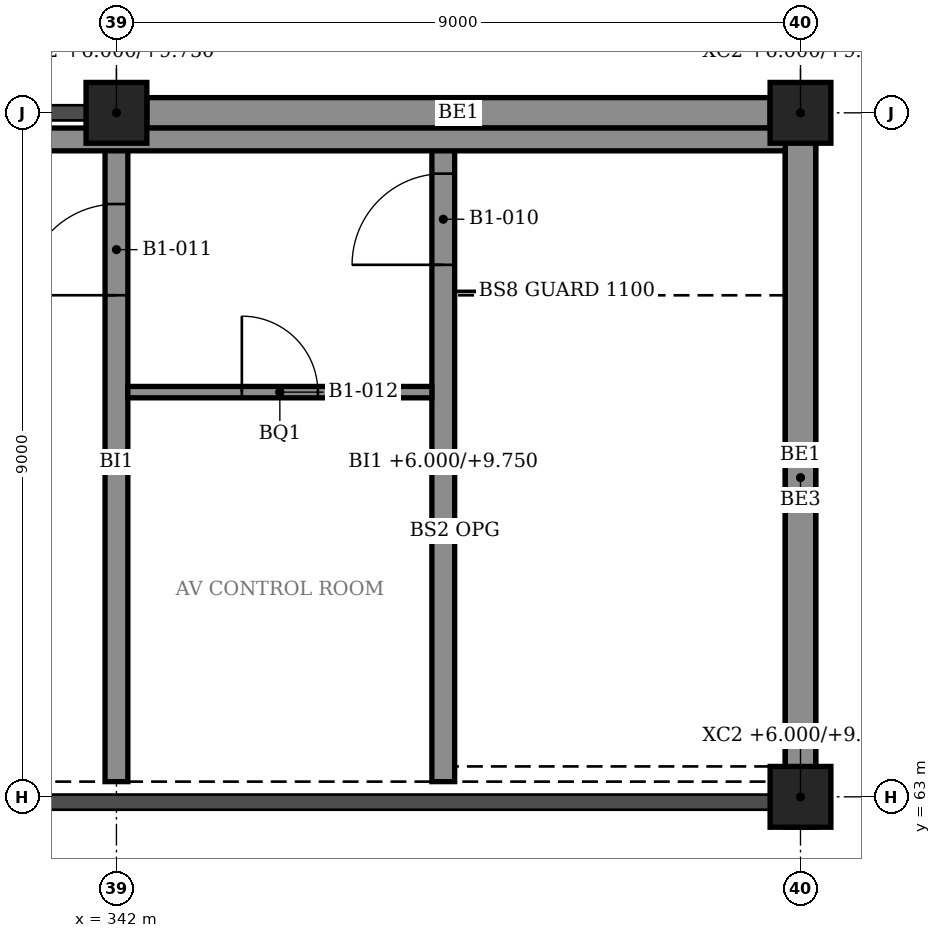
"""IFC4 building model, lengths in metres.
Left out: names, types, materials, properties, quantities, classifications, styles, units other than length and angle.
Written with IfcOpenShell. Run it as: python <this file> out.ifc"""

import sys

from ifc_helpers import new_model, si_unit, direction, frame, frame_2d, origin, origin_2d, place, context, subcontext, project, spatial, rectangle, extrude, element, fill, save


model = new_model("IFC4")
c1 = context("Model", 3, precision=1e-05, world=origin(), true_north=direction((0.0, 1.0)))
c2 = subcontext(c1, "Body", "Model", "MODEL_VIEW")
j1 = project(units=[si_unit("LENGTHUNIT", "METRE"), si_unit("PLANEANGLEUNIT", "RADIAN")], contexts=[c1])
p1 = place(None, origin())
s1 = spatial("IfcSite", under=j1, at=p1, CompositionType="ELEMENT")
p2 = place(p1, origin())
s2 = spatial("IfcBuilding", under=s1, at=p2, CompositionType="ELEMENT")
p3 = place(p2, frame((0.0, 0.0, 6.0)))
s3 = spatial("IfcBuildingStorey", under=s2, at=p3, CompositionType="ELEMENT", Elevation=6.0)
for number, where, z_axis, x_axis in (
    (1, (351.0, 63.0, 0.0), (0.0, 0.0, 1.0), (1.0, 0.0, 0.0)),
    (2, (342.0, 72.0, 0.0), (0.0, 0.0, 1.0), (1.0, 0.0, 0.0)),
    (3, (351.0, 72.0, 0.0), (0.0, 0.0, 1.0), (1.0, 0.0, 0.0)),
):
    element("IfcColumn", number, at=place(p3, frame(where, z_axis=z_axis, x_axis=x_axis)), inside=s3, PredefinedType="COLUMN", context=c2, shape_type="SweptSolid", body=[
        extrude(rectangle(XDim=0.8, YDim=0.8, at=origin_2d()), origin(), (0.0, 0.0, 1.0), 3.75),
    ])
p4 = place(p2, origin())
s4 = spatial("IfcBuildingStorey", under=s2, at=p4, CompositionType="ELEMENT", Elevation=0.0)
p5 = place(p4, frame((288.4, 63.0, -0.3), z_axis=(0.0, 0.0, 1.0), x_axis=(1.0, 0.0, 0.0)))
e4 = element("IfcWall", 4, at=p5, inside=s4, PredefinedType="SHEAR", context=c2, shape_type="SweptSolid", body=[
    extrude(rectangle(XDim=62.2, YDim=0.4, at=frame_2d((31.1, 0.0))), origin(), (0.0, 0.0, 1.0), 10.625),
])
p6 = place(p5, frame((14.25, 0.0, 0.3)))
e5 = element("IfcOpeningElement", 5, at=p6, cuts=e4, PredefinedType="OPENING", context=c2, shape_type="SweptSolid", body=[
    extrude(rectangle(XDim=2.7, YDim=2.4, at=frame_2d((1.35, 1.2))), frame((0.0, 0.21, 0.0), z_axis=(0.0, -1.0, 0.0), x_axis=(1.0, 0.0, 0.0)), (0.0, 0.0, 1.0), 0.42),
])
p7 = place(p5, frame((19.45, 0.0, 0.3)))
e6 = element("IfcOpeningElement", 6, at=p7, cuts=e4, PredefinedType="OPENING", context=c2, shape_type="SweptSolid", body=[
    extrude(rectangle(XDim=2.7, YDim=2.4, at=frame_2d((1.35, 1.2))), frame((0.0, 0.21, 0.0), z_axis=(0.0, -1.0, 0.0), x_axis=(1.0, 0.0, 0.0)), (0.0, 0.0, 1.0), 0.42),
])
p8 = place(p5, frame((24.65, 0.0, 0.3)))
e7 = element("IfcOpeningElement", 7, at=p8, cuts=e4, PredefinedType="OPENING", context=c2, shape_type="SweptSolid", body=[
    extrude(rectangle(XDim=2.7, YDim=2.4, at=frame_2d((1.35, 1.2))), frame((0.0, 0.21, 0.0), z_axis=(0.0, -1.0, 0.0), x_axis=(1.0, 0.0, 0.0)), (0.0, 0.0, 1.0), 0.42),
])
p9 = place(p5, frame((29.85, 0.0, 0.3)))
e8 = element("IfcOpeningElement", 8, at=p9, cuts=e4, PredefinedType="OPENING", context=c2, shape_type="SweptSolid", body=[
    extrude(rectangle(XDim=2.7, YDim=2.4, at=frame_2d((1.35, 1.2))), frame((0.0, 0.21, 0.0), z_axis=(0.0, -1.0, 0.0), x_axis=(1.0, 0.0, 0.0)), (0.0, 0.0, 1.0), 0.42),
])
p10 = place(p5, frame((35.05, 0.0, 0.3)))
e9 = element("IfcOpeningElement", 9, at=p10, cuts=e4, PredefinedType="OPENING", context=c2, shape_type="SweptSolid", body=[
    extrude(rectangle(XDim=2.7, YDim=2.4, at=frame_2d((1.35, 1.2))), frame((0.0, 0.21, 0.0), z_axis=(0.0, -1.0, 0.0), x_axis=(1.0, 0.0, 0.0)), (0.0, 0.0, 1.0), 0.42),
])
p11 = place(p5, frame((40.25, 0.0, 0.3)))
e10 = element("IfcOpeningElement", 10, at=p11, cuts=e4, PredefinedType="OPENING", context=c2, shape_type="SweptSolid", body=[
    extrude(rectangle(XDim=2.7, YDim=2.4, at=frame_2d((1.35, 1.2))), frame((0.0, 0.21, 0.0), z_axis=(0.0, -1.0, 0.0), x_axis=(1.0, 0.0, 0.0)), (0.0, 0.0, 1.0), 0.42),
])
p12 = place(p5, frame((45.45, 0.0, 0.3)))
e11 = element("IfcOpeningElement", 11, at=p12, cuts=e4, PredefinedType="OPENING", context=c2, shape_type="SweptSolid", body=[
    extrude(rectangle(XDim=2.7, YDim=2.4, at=frame_2d((1.35, 1.2))), frame((0.0, 0.21, 0.0), z_axis=(0.0, -1.0, 0.0), x_axis=(1.0, 0.0, 0.0)), (0.0, 0.0, 1.0), 0.42),
])
for number, where, z_axis, x_axis in (
    (12, (351.0, 63.4, 0.0), (0.0, 0.0, 1.0), (0.0, 1.0, 0.0)),
    (13, (342.4, 72.0, 0.0), (0.0, 0.0, 1.0), (1.0, 0.0, 0.0)),
):
    element("IfcWall", number, at=place(p3, frame(where, z_axis=z_axis, x_axis=x_axis)), inside=s3, PredefinedType="STANDARD", context=c2, shape_type="SweptSolid", body=[
        extrude(rectangle(XDim=8.2, YDim=0.4, at=frame_2d((4.1, 0.0))), origin(), (0.0, 0.0, 1.0), 3.05),
    ])
p13 = place(p3, frame((351.0, 62.6, 4.0), z_axis=(0.0, 0.0, 1.0), x_axis=(0.0, 1.0, 0.0)))
e14 = element("IfcWall", 14, at=p13, inside=s3, PredefinedType="PARAPET", context=c2, shape_type="SweptSolid", body=[
    extrude(rectangle(XDim=9.2, YDim=0.4, at=frame_2d((4.6, 0.0))), origin(), (0.0, 0.0, 1.0), 1.121),
])
p14 = place(p3, frame((288.2, 71.65, 4.0), z_axis=(0.0, 0.0, 1.0), x_axis=(1.0, 0.0, 0.0)))
e15 = element("IfcWall", 15, at=p14, inside=s3, PredefinedType="PARAPET", context=c2, shape_type="SweptSolid", body=[
    extrude(rectangle(XDim=62.6, YDim=0.3, at=frame_2d((31.3, 0.0))), origin(), (0.0, 0.0, 1.0), 1.121),
])
p15 = place(p3, frame((346.3, 63.2, 0.0), z_axis=(0.0, 0.0, 1.0), x_axis=(0.0, 1.0, 0.0)))
e16 = element("IfcWall", 16, at=p15, inside=s3, PredefinedType="STANDARD", context=c2, shape_type="SweptSolid", body=[
    extrude(rectangle(XDim=8.4, YDim=0.3, at=frame_2d((4.2, 0.0))), origin(), (0.0, 0.0, 1.0), 3.75),
])
p16 = place(p15, frame((6.8, 0.0, 0.0)))
e17 = element("IfcOpeningElement", 17, at=p16, cuts=e16, PredefinedType="OPENING", context=c2, shape_type="SweptSolid", body=[
    extrude(rectangle(XDim=1.2, YDim=2.4, at=frame_2d((0.6, 1.2))), frame((0.0, 0.16, 0.0), z_axis=(0.0, -1.0, 0.0), x_axis=(1.0, 0.0, 0.0)), (0.0, 0.0, 1.0), 0.32),
])
p17 = place(p3, frame((342.0, 63.2, 0.0), z_axis=(0.0, 0.0, 1.0), x_axis=(0.0, 1.0, 0.0)))
e18 = element("IfcWall", 18, at=p17, inside=s3, PredefinedType="STANDARD", context=c2, shape_type="SweptSolid", body=[
    extrude(rectangle(XDim=8.4, YDim=0.3, at=frame_2d((4.2, 0.0))), origin(), (0.0, 0.0, 1.0), 3.05),
])
p18 = place(p17, frame((6.4, 0.0, 0.0)))
e19 = element("IfcOpeningElement", 19, at=p18, cuts=e18, PredefinedType="OPENING", context=c2, shape_type="SweptSolid", body=[
    extrude(rectangle(XDim=1.2, YDim=2.4, at=frame_2d((0.6, 1.2))), frame((0.0, 0.16, 0.0), z_axis=(0.0, -1.0, 0.0), x_axis=(1.0, 0.0, 0.0)), (0.0, 0.0, 1.0), 0.32),
])
p19 = place(p3, frame((342.15, 68.325, 0.0), z_axis=(0.0, 0.0, 1.0), x_axis=(1.0, 0.0, 0.0)))
e20 = element("IfcWall", 20, at=p19, inside=s3, PredefinedType="PARTITIONING", context=c2, shape_type="SweptSolid", body=[
    extrude(rectangle(XDim=4.0, YDim=0.15, at=frame_2d((2.0, 0.0))), origin(), (0.0, 0.0, 1.0), 3.75),
])
p20 = place(p19, frame((1.5, 0.0, 0.0)))
e21 = element("IfcOpeningElement", 21, at=p20, cuts=e20, PredefinedType="OPENING", context=c2, shape_type="SweptSolid", body=[
    extrude(rectangle(XDim=1.0, YDim=2.4, at=frame_2d((0.5, 1.2))), frame((0.0, 0.085, 0.0), z_axis=(0.0, -1.0, 0.0), x_axis=(1.0, 0.0, 0.0)), (0.0, 0.0, 1.0), 0.17),
])
p21 = place(p16, origin())
e22 = element("IfcDoor", 22, at=p21, inside=s3, OperationType="SINGLE_SWING_LEFT", PredefinedType="DOOR", context=c2, shape_type="SweptSolid", body=[
    extrude(rectangle(XDim=1.2, YDim=2.4, at=frame_2d((0.6, 1.2))), frame((0.0, 0.025, 0.0), z_axis=(0.0, -1.0, 0.0), x_axis=(1.0, 0.0, 0.0)), (0.0, 0.0, 1.0), 0.05),
])
fill(e17, e22)
p22 = place(p18, origin())
e23 = element("IfcDoor", 23, at=p22, inside=s3, OperationType="SINGLE_SWING_LEFT", PredefinedType="DOOR", context=c2, shape_type="SweptSolid", body=[
    extrude(rectangle(XDim=1.2, YDim=2.4, at=frame_2d((0.6, 1.2))), frame((0.0, 0.025, 0.0), z_axis=(0.0, -1.0, 0.0), x_axis=(1.0, 0.0, 0.0)), (0.0, 0.0, 1.0), 0.05),
])
fill(e19, e23)
p23 = place(p20, origin())
e24 = element("IfcDoor", 24, at=p23, inside=s3, OperationType="SINGLE_SWING_LEFT", PredefinedType="DOOR", context=c2, shape_type="SweptSolid", body=[
    extrude(rectangle(XDim=1.0, YDim=2.4, at=frame_2d((0.5, 1.2))), frame((0.0, 0.025, 0.0), z_axis=(0.0, -1.0, 0.0), x_axis=(1.0, 0.0, 0.0)), (0.0, 0.0, 1.0), 0.05),
])
fill(e21, e24)
save(model, sys.argv[1])
